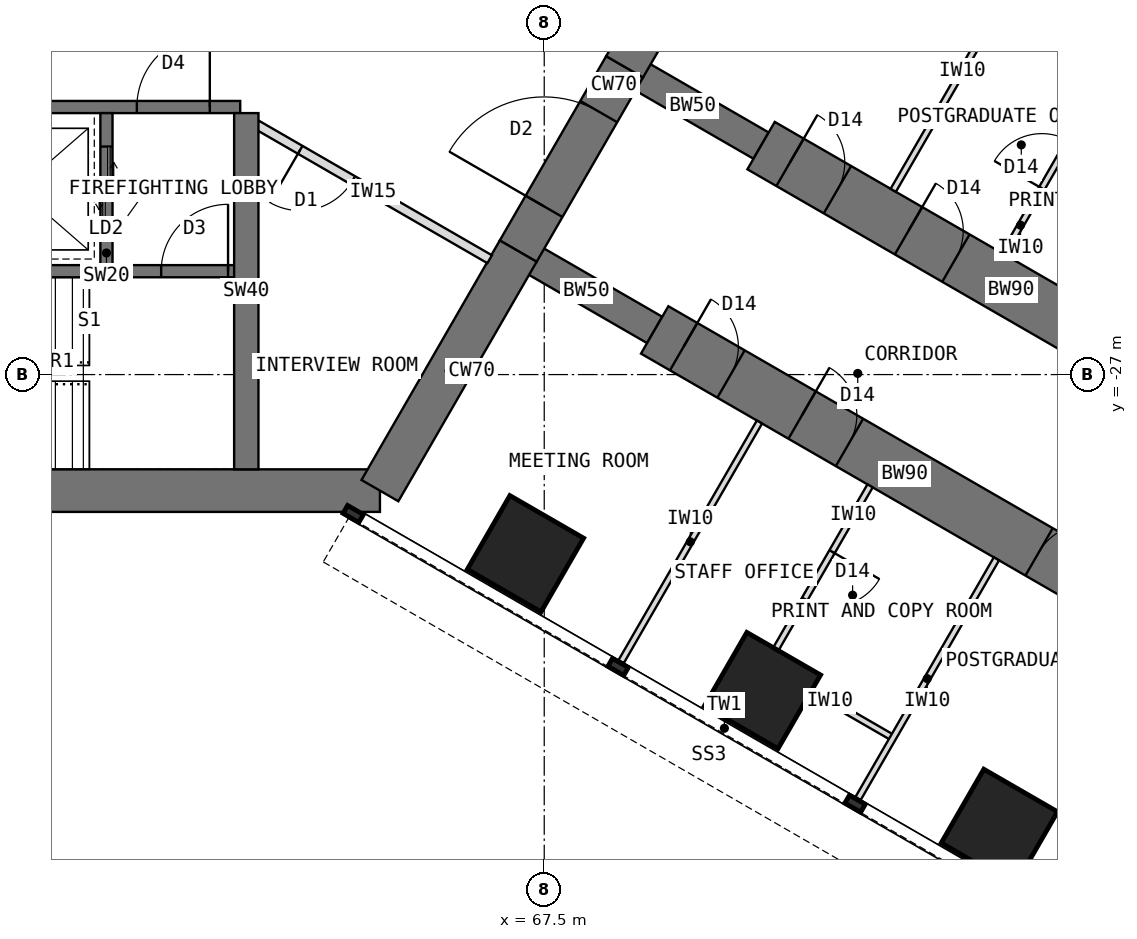
"""IFC4 building model, lengths in metres.
Left out: names, types, materials, properties, quantities, classifications, styles, units other than length and angle.
Written with IfcOpenShell. Run it as: python <this file> out.ifc"""

import sys

from ifc_helpers import new_model, si_unit, direction, frame, frame_2d, origin, origin_2d, place, context, subcontext, project, spatial, rectangle, extrude, element, fill, save


model = new_model("IFC4")
c1 = context("Model", 3, precision=1e-05, world=origin(), true_north=direction((0.0, 1.0)))
c2 = subcontext(c1, "Body", "Model", "MODEL_VIEW")
j1 = project(units=[si_unit("LENGTHUNIT", "METRE"), si_unit("PLANEANGLEUNIT", "RADIAN")], contexts=[c1])
p1 = place(None, origin())
s1 = spatial("IfcSite", under=j1, at=p1, CompositionType="ELEMENT")
p2 = place(p1, origin())
s2 = spatial("IfcBuilding", under=s1, at=p2, CompositionType="ELEMENT")
p3 = place(p2, frame((0.0, 0.0, 88.5)))
s3 = spatial("IfcBuildingStorey", under=s2, at=p3, CompositionType="ELEMENT", Elevation=88.5)
p4 = place(p3, frame((52.202, -28.908, 0.0), z_axis=(0.0, 0.0, 1.0), x_axis=(1.0, 0.0, 0.0)))
e1 = element("IfcWall", 1, at=p4, inside=s3, PredefinedType="SHEAR", context=c2, shape_type="SweptSolid", body=[
    extrude(rectangle(XDim=12.596, YDim=0.7, at=frame_2d((6.298, 0.0))), origin(), (0.0, 0.0, 1.0), 4.0),
])
p5 = place(p3, frame((64.798, -28.908, 0.0), z_axis=(0.0, 0.0, 1.0), x_axis=(0.499984222037, 0.866034513004, 0.0)))
e2 = element("IfcWall", 2, at=p5, inside=s3, PredefinedType="SHEAR", context=c2, shape_type="SweptSolid", body=[
    extrude(rectangle(XDim=4.548, YDim=0.7, at=frame_2d((2.274, 0.0))), origin(), (0.0, 0.0, 1.0), 4.0),
])
p6 = place(p3, frame((67.072, -24.97, 0.0), z_axis=(0.0, 0.0, 1.0), x_axis=(0.500010275428, 0.866019471182, 0.0)))
e3 = element("IfcWall", 3, at=p6, inside=s3, PredefinedType="SHEAR", context=c2, shape_type="SweptSolid", body=[
    extrude(rectangle(XDim=3.5, YDim=0.7, at=frame_2d((1.75, 0.0))), origin(), (0.0, 0.0, 1.0), 4.0),
])
p7 = place(p6, frame((0.85, 0.0, 0.0)))
e4 = element("IfcOpeningElement", 4, at=p7, cuts=e3, PredefinedType="OPENING", context=c2, shape_type="SweptSolid", body=[
    extrude(rectangle(XDim=1.8, YDim=2.1, at=frame_2d((0.9, 1.05))), frame((0.0, 0.36, 0.0), z_axis=(0.0, -1.0, 0.0), x_axis=(1.0, 0.0, 0.0)), (0.0, 0.0, 1.0), 0.72),
])
p8 = place(p3, frame((68.822, -21.939, 0.0), z_axis=(0.0, 0.0, 1.0), x_axis=(0.500024481964, 0.866011268655, 0.0)))
e5 = element("IfcWall", 5, at=p8, inside=s3, PredefinedType="SHEAR", context=c2, shape_type="SweptSolid", body=[
    extrude(rectangle(XDim=4.548, YDim=0.7, at=frame_2d((2.274, 0.0))), origin(), (0.0, 0.0, 1.0), 4.0),
])
p9 = place(p3, frame((68.822, -21.939, 0.0), z_axis=(0.0, 0.0, 1.0), x_axis=(0.866072649678, -0.499918158782, 0.0)))
e6 = element("IfcWall", 6, at=p9, inside=s3, PredefinedType="SHEAR", context=c2, shape_type="SweptSolid", body=[
    extrude(rectangle(XDim=2.592, YDim=0.5, at=frame_2d((1.296, 0.0))), origin(), (0.0, 0.0, 1.0), 4.0),
])
p10 = place(p3, frame((71.066, -23.234, 0.0), z_axis=(0.0, 0.0, 1.0), x_axis=(0.86602681393, -0.499997557548, 0.0)))
e7 = element("IfcWall", 7, at=p10, inside=s3, PredefinedType="SHEAR", context=c2, shape_type="SweptSolid", body=[
    extrude(rectangle(XDim=9.5, YDim=0.9, at=frame_2d((4.75, 0.0))), origin(), (0.0, 0.0, 1.0), 4.0),
])
p11 = place(p10, frame((0.55, 0.0, 0.0)))
e8 = element("IfcOpeningElement", 8, at=p11, cuts=e7, PredefinedType="OPENING", context=c2, shape_type="SweptSolid", body=[
    extrude(rectangle(XDim=0.9, YDim=2.1, at=frame_2d((0.45, 1.05))), frame((0.0, 0.46, 0.0), z_axis=(0.0, -1.0, 0.0), x_axis=(1.0, 0.0, 0.0)), (0.0, 0.0, 1.0), 0.92),
])
p12 = place(p10, frame((2.8, 0.0, 0.0)))
e9 = element("IfcOpeningElement", 9, at=p12, cuts=e7, PredefinedType="OPENING", context=c2, shape_type="SweptSolid", body=[
    extrude(rectangle(XDim=0.9, YDim=2.1, at=frame_2d((0.45, 1.05))), frame((0.0, 0.46, 0.0), z_axis=(0.0, -1.0, 0.0), x_axis=(1.0, 0.0, 0.0)), (0.0, 0.0, 1.0), 0.92),
])
p13 = place(p10, frame((7.3, 0.0, 0.0)))
e10 = element("IfcOpeningElement", 10, at=p13, cuts=e7, PredefinedType="OPENING", context=c2, shape_type="SweptSolid", body=[
    extrude(rectangle(XDim=0.9, YDim=2.1, at=frame_2d((0.45, 1.05))), frame((0.0, 0.46, 0.0), z_axis=(0.0, -1.0, 0.0), x_axis=(1.0, 0.0, 0.0)), (0.0, 0.0, 1.0), 0.92),
])
p14 = place(p3, frame((67.072, -24.97, 0.0), z_axis=(0.0, 0.0, 1.0), x_axis=(0.866031863473, -0.499988811324, 0.0)))
e11 = element("IfcWall", 11, at=p14, inside=s3, PredefinedType="SHEAR", context=c2, shape_type="SweptSolid", body=[
    extrude(rectangle(XDim=2.592, YDim=0.5, at=frame_2d((1.296, 0.0))), origin(), (0.0, 0.0, 1.0), 4.0),
])
p15 = place(p3, frame((69.316, -26.266, 0.0), z_axis=(0.0, 0.0, 1.0), x_axis=(0.86602681393, -0.499997557548, 0.0)))
e12 = element("IfcWall", 12, at=p15, inside=s3, PredefinedType="SHEAR", context=c2, shape_type="SweptSolid", body=[
    extrude(rectangle(XDim=9.5, YDim=0.9, at=frame_2d((4.75, 0.0))), origin(), (0.0, 0.0, 1.0), 4.0),
])
p16 = place(p15, frame((0.55, 0.0, 0.0)))
e13 = element("IfcOpeningElement", 13, at=p16, cuts=e12, PredefinedType="OPENING", context=c2, shape_type="SweptSolid", body=[
    extrude(rectangle(XDim=0.9, YDim=2.1, at=frame_2d((0.45, 1.05))), frame((0.0, 0.46, 0.0), z_axis=(0.0, -1.0, 0.0), x_axis=(1.0, 0.0, 0.0)), (0.0, 0.0, 1.0), 0.92),
])
p17 = place(p15, frame((2.8, 0.0, 0.0)))
e14 = element("IfcOpeningElement", 14, at=p17, cuts=e12, PredefinedType="OPENING", context=c2, shape_type="SweptSolid", body=[
    extrude(rectangle(XDim=0.9, YDim=2.1, at=frame_2d((0.45, 1.05))), frame((0.0, 0.46, 0.0), z_axis=(0.0, -1.0, 0.0), x_axis=(1.0, 0.0, 0.0)), (0.0, 0.0, 1.0), 0.92),
])
p18 = place(p15, frame((7.3, 0.0, 0.0)))
e15 = element("IfcOpeningElement", 15, at=p18, cuts=e12, PredefinedType="OPENING", context=c2, shape_type="SweptSolid", body=[
    extrude(rectangle(XDim=0.9, YDim=2.1, at=frame_2d((0.45, 1.05))), frame((0.0, 0.46, 0.0), z_axis=(0.0, -1.0, 0.0), x_axis=(1.0, 0.0, 0.0)), (0.0, 0.0, 1.0), 0.92),
])
for number, where, z_axis, x_axis in (
    (16, (67.191, -29.946, 0.0), (0.0, 0.0, 1.0), (0.5, 0.866, 0.0)),
    (17, (71.088, -32.196, 0.0), (0.0, 0.0, 1.0), (0.5, 0.866, 0.0)),
    (18, (74.986, -34.446, 0.0), (0.0, 0.0, 1.0), (0.5, 0.866, 0.0)),
):
    element("IfcColumn", number, at=place(p3, frame(where, z_axis=z_axis, x_axis=x_axis)), inside=s3, PredefinedType="COLUMN", context=c2, shape_type="SweptSolid", body=[
        extrude(rectangle(XDim=1.4, YDim=1.4, at=origin_2d()), origin(), (0.0, 0.0, 1.0), 4.0),
    ])
p19 = place(p3, frame((54.5, -22.6, 0.0), z_axis=(0.0, 0.0, 1.0), x_axis=(1.0, 0.0, 0.0)))
e19 = element("IfcWall", 19, at=p19, inside=s3, PredefinedType="SHEAR", context=c2, shape_type="SweptSolid", body=[
    extrude(rectangle(XDim=8.0, YDim=0.2, at=frame_2d((4.0, 0.0))), origin(), (0.0, 0.0, 1.0), 4.0),
])
p20 = place(p19, frame((6.3, 0.0, 0.0)))
e20 = element("IfcOpeningElement", 20, at=p20, cuts=e19, PredefinedType="OPENING", context=c2, shape_type="SweptSolid", body=[
    extrude(rectangle(XDim=1.2, YDim=2.1, at=frame_2d((0.6, 1.05))), frame((0.0, 0.11, 0.0), z_axis=(0.0, -1.0, 0.0), x_axis=(1.0, 0.0, 0.0)), (0.0, 0.0, 1.0), 0.22),
])
p21 = place(p19, frame((0.9, 0.0, 0.0)))
e21 = element("IfcOpeningElement", 21, at=p21, cuts=e19, PredefinedType="OPENING", context=c2, shape_type="SweptSolid", body=[
    extrude(rectangle(XDim=1.1, YDim=2.2, at=frame_2d((0.55, 1.1))), frame((0.0, 0.11, 0.0), z_axis=(0.0, -1.0, 0.0), x_axis=(1.0, 0.0, 0.0)), (0.0, 0.0, 1.0), 0.22),
])
p22 = place(p3, frame((60.3, -22.7, 0.0), z_axis=(0.0, 0.0, 1.0), x_axis=(0.0, -1.0, 0.0)))
e22 = element("IfcWall", 22, at=p22, inside=s3, PredefinedType="SHEAR", context=c2, shape_type="SweptSolid", body=[
    extrude(rectangle(XDim=2.6, YDim=0.2, at=frame_2d((1.3, 0.0))), origin(), (0.0, 0.0, 1.0), 4.0),
])
p23 = place(p22, frame((0.55, 0.0, 0.0)))
e23 = element("IfcOpeningElement", 23, at=p23, cuts=e22, PredefinedType="OPENING", context=c2, shape_type="SweptSolid", body=[
    extrude(rectangle(XDim=1.3, YDim=2.2, at=frame_2d((0.65, 1.1))), frame((0.0, 0.11, 0.0), z_axis=(0.0, -1.0, 0.0), x_axis=(1.0, 0.0, 0.0)), (0.0, 0.0, 1.0), 0.22),
])
p24 = place(p3, frame((54.5, -25.3, 0.0), z_axis=(0.0, 0.0, 1.0), x_axis=(1.0, 0.0, 0.0)))
e24 = element("IfcWall", 24, at=p24, inside=s3, PredefinedType="SHEAR", context=c2, shape_type="SweptSolid", body=[
    extrude(rectangle(XDim=8.0, YDim=0.2, at=frame_2d((4.0, 0.0))), origin(), (0.0, 0.0, 1.0), 4.0),
])
p25 = place(p24, frame((6.7, 0.0, 0.0)))
e25 = element("IfcOpeningElement", 25, at=p25, cuts=e24, PredefinedType="OPENING", context=c2, shape_type="SweptSolid", body=[
    extrude(rectangle(XDim=1.1, YDim=2.1, at=frame_2d((0.55, 1.05))), frame((0.0, 0.11, 0.0), z_axis=(0.0, -1.0, 0.0), x_axis=(1.0, 0.0, 0.0)), (0.0, 0.0, 1.0), 0.22),
])
p26 = place(p3, frame((62.6, -22.7, 0.0), z_axis=(0.0, 0.0, 1.0), x_axis=(0.0, -1.0, 0.0)))
e26 = element("IfcWall", 26, at=p26, inside=s3, PredefinedType="SHEAR", context=c2, shape_type="SweptSolid", body=[
    extrude(rectangle(XDim=5.858, YDim=0.4, at=frame_2d((2.929, 0.0))), origin(), (0.0, 0.0, 1.0), 4.0),
])
p27 = place(p3, frame((73.24, -23.97, 0.0), z_axis=(0.0, 0.0, 1.0), x_axis=(0.499982560684, 0.866035472144, 0.0)))
e27 = element("IfcWall", 27, at=p27, inside=s3, PredefinedType="PARTITIONING", context=c2, shape_type="SweptSolid", body=[
    extrude(rectangle(XDim=4.55, YDim=0.1, at=frame_2d((2.275, 0.0))), origin(), (0.0, 0.0, 1.0), 3.7),
])
p28 = place(p3, frame((75.059, -25.02, 0.0), z_axis=(0.0, 0.0, 1.0), x_axis=(0.499977295307, 0.866038511948, 0.0)))
e28 = element("IfcWall", 28, at=p28, inside=s3, PredefinedType="PARTITIONING", context=c2, shape_type="SweptSolid", body=[
    extrude(rectangle(XDim=3.4, YDim=0.1, at=frame_2d((1.7, 0.0))), origin(), (0.0, 0.0, 1.0), 3.7),
])
p29 = place(p28, frame((1.25, 0.0, 0.0)))
e29 = element("IfcOpeningElement", 29, at=p29, cuts=e28, PredefinedType="OPENING", context=c2, shape_type="SweptSolid", body=[
    extrude(rectangle(XDim=0.9, YDim=2.1, at=frame_2d((0.45, 1.05))), frame((0.0, 0.06, 0.0), z_axis=(0.0, -1.0, 0.0), x_axis=(1.0, 0.0, 0.0)), (0.0, 0.0, 1.0), 0.12),
])
for number, where, z_axis, x_axis in (
    (30, (71.04, -27.78, 0.0), (0.0, 0.0, 1.0), (-0.5, -0.866, 0.0)),
    (31, (74.937, -30.03, 0.0), (0.0, 0.0, 1.0), (-0.5, -0.866, 0.0)),
):
    element("IfcWall", number, at=place(p3, frame(where, z_axis=z_axis, x_axis=x_axis)), inside=s3, PredefinedType="PARTITIONING", context=c2, shape_type="SweptSolid", body=[
        extrude(rectangle(XDim=4.55, YDim=0.1, at=frame_2d((2.275, 0.0))), origin(), (0.0, 0.0, 1.0), 3.7),
    ])
p30 = place(p3, frame((71.158, -31.775, 0.0), z_axis=(0.0, 0.0, 1.0), x_axis=(0.866006032174, -0.500033551112, 0.0)))
e32 = element("IfcWall", 32, at=p30, inside=s3, PredefinedType="PARTITIONING", context=c2, shape_type="SweptSolid", body=[
    extrude(rectangle(XDim=2.4, YDim=0.1, at=frame_2d((1.2, 0.0))), origin(), (0.0, 0.0, 1.0), 3.7),
])
p31 = place(p3, frame((72.859, -28.83, 0.0), z_axis=(0.0, 0.0, 1.0), x_axis=(-0.500062241894, -0.865989465428, 0.0)))
e33 = element("IfcWall", 33, at=p31, inside=s3, PredefinedType="PARTITIONING", context=c2, shape_type="SweptSolid", body=[
    extrude(rectangle(XDim=3.4, YDim=0.1, at=frame_2d((1.7, 0.0))), origin(), (0.0, 0.0, 1.0), 3.7),
])
p32 = place(p31, frame((1.25, 0.0, 0.0)))
e34 = element("IfcOpeningElement", 34, at=p32, cuts=e33, PredefinedType="OPENING", context=c2, shape_type="SweptSolid", body=[
    extrude(rectangle(XDim=0.9, YDim=2.1, at=frame_2d((0.45, 1.05))), frame((0.0, 0.06, 0.0), z_axis=(0.0, -1.0, 0.0), x_axis=(1.0, 0.0, 0.0)), (0.0, 0.0, 1.0), 0.12),
])
p33 = place(p3, frame((66.603, -25.103, 0.0), z_axis=(0.0, 0.0, 1.0), x_axis=(-0.866021148949, 0.500007369519, 0.0)))
e35 = element("IfcWall", 35, at=p33, inside=s3, PredefinedType="PARTITIONING", context=c2, shape_type="SweptSolid", body=[
    extrude(rectangle(XDim=4.426, YDim=0.15, at=frame_2d((2.213, 0.0))), origin(), (0.0, 0.0, 1.0), 3.7),
])
p34 = place(p33, frame((2.598, 0.0, 0.0)))
e36 = element("IfcOpeningElement", 36, at=p34, cuts=e35, PredefinedType="OPENING", context=c2, shape_type="SweptSolid", body=[
    extrude(rectangle(XDim=1.0, YDim=2.1, at=frame_2d((0.5, 1.05))), frame((0.0, 0.085, 0.0), z_axis=(0.0, -1.0, 0.0), x_axis=(1.0, 0.0, 0.0)), (0.0, 0.0, 1.0), 0.17),
])
p35 = place(p20, origin())
e37 = element("IfcDoor", 37, at=p35, inside=s3, OperationType="SINGLE_SWING_RIGHT", PredefinedType="DOOR", context=c2, shape_type="SweptSolid", body=[
    extrude(rectangle(XDim=1.2, YDim=2.1, at=frame_2d((0.6, 1.05))), frame((0.0, 0.025, 0.0), z_axis=(0.0, -1.0, 0.0), x_axis=(1.0, 0.0, 0.0)), (0.0, 0.0, 1.0), 0.05),
])
fill(e20, e37)
p36 = place(p23, origin())
e38 = element("IfcDoor", 38, at=p36, inside=s3, OperationType="DOUBLE_DOOR_SLIDING", PredefinedType="DOOR", context=c2, shape_type="SweptSolid", body=[
    extrude(rectangle(XDim=1.3, YDim=2.2, at=frame_2d((0.65, 1.1))), frame((0.0, 0.025, 0.0), z_axis=(0.0, -1.0, 0.0), x_axis=(1.0, 0.0, 0.0)), (0.0, 0.0, 1.0), 0.05),
])
fill(e23, e38)
p37 = place(p25, origin())
e39 = element("IfcDoor", 39, at=p37, inside=s3, OperationType="SINGLE_SWING_RIGHT", PredefinedType="DOOR", context=c2, shape_type="SweptSolid", body=[
    extrude(rectangle(XDim=1.1, YDim=2.1, at=frame_2d((0.55, 1.05))), frame((0.0, 0.025, 0.0), z_axis=(0.0, -1.0, 0.0), x_axis=(1.0, 0.0, 0.0)), (0.0, 0.0, 1.0), 0.05),
])
fill(e25, e39)
p38 = place(p7, origin())
e40 = element("IfcDoor", 40, at=p38, inside=s3, OperationType="DOUBLE_DOOR_DOUBLE_SWING", PredefinedType="DOOR", context=c2, shape_type="SweptSolid", body=[
    extrude(rectangle(XDim=1.72, YDim=2.06, at=frame_2d((0.9, 1.03))), frame((0.0, 0.025, 0.0), z_axis=(0.0, -1.0, 0.0), x_axis=(1.0, 0.0, 0.0)), (0.0, 0.0, 1.0), 0.05),
    extrude(rectangle(XDim=0.04, YDim=2.1, at=frame_2d((0.02, 1.05))), frame((0.0, 0.35, 0.0), z_axis=(0.0, -1.0, 0.0), x_axis=(1.0, 0.0, 0.0)), (0.0, 0.0, 1.0), 0.699),
    extrude(rectangle(XDim=0.04, YDim=2.1, at=frame_2d((1.78, 1.05))), frame((0.0, 0.35, 0.0), z_axis=(0.0, -1.0, 0.0), x_axis=(1.0, 0.0, 0.0)), (0.0, 0.0, 1.0), 0.699),
    extrude(rectangle(XDim=1.72, YDim=0.04, at=frame_2d((0.9, 2.08))), frame((0.0, 0.35, 0.0), z_axis=(0.0, -1.0, 0.0), x_axis=(1.0, 0.0, 0.0)), (0.0, 0.0, 1.0), 0.699),
])
fill(e4, e40)
p39 = place(p29, origin())
e41 = element("IfcDoor", 41, at=p39, inside=s3, OperationType="SINGLE_SWING_LEFT", PredefinedType="DOOR", context=c2, shape_type="SweptSolid", body=[
    extrude(rectangle(XDim=0.9, YDim=2.1, at=frame_2d((0.45, 1.05))), frame((0.0, 0.025, 0.0), z_axis=(0.0, -1.0, 0.0), x_axis=(1.0, 0.0, 0.0)), (0.0, 0.0, 1.0), 0.05),
])
fill(e29, e41)
p40 = place(p32, origin())
e42 = element("IfcDoor", 42, at=p40, inside=s3, OperationType="SINGLE_SWING_LEFT", PredefinedType="DOOR", context=c2, shape_type="SweptSolid", body=[
    extrude(rectangle(XDim=0.9, YDim=2.1, at=frame_2d((0.45, 1.05))), frame((0.0, 0.025, 0.0), z_axis=(0.0, -1.0, 0.0), x_axis=(1.0, 0.0, 0.0)), (0.0, 0.0, 1.0), 0.05),
])
fill(e34, e42)
p41 = place(p34, origin())
e43 = element("IfcDoor", 43, at=p41, inside=s3, OperationType="SINGLE_SWING_RIGHT", PredefinedType="DOOR", context=c2, shape_type="SweptSolid", body=[
    extrude(rectangle(XDim=1.0, YDim=2.1, at=frame_2d((0.5, 1.05))), frame((0.0, 0.025, 0.0), z_axis=(0.0, -1.0, 0.0), x_axis=(1.0, 0.0, 0.0)), (0.0, 0.0, 1.0), 0.05),
])
fill(e36, e43)
p42 = place(p11, origin())
e44 = element("IfcDoor", 44, at=p42, inside=s3, OperationType="SINGLE_SWING_LEFT", PredefinedType="DOOR", context=c2, shape_type="SweptSolid", body=[
    extrude(rectangle(XDim=0.82, YDim=2.06, at=frame_2d((0.45, 1.03))), frame((0.0, 0.025, 0.0), z_axis=(0.0, -1.0, 0.0), x_axis=(1.0, 0.0, 0.0)), (0.0, 0.0, 1.0), 0.05),
    extrude(rectangle(XDim=0.04, YDim=2.1, at=frame_2d((0.02, 1.05))), frame((0.0, 0.45, 0.0), z_axis=(0.0, -1.0, 0.0), x_axis=(1.0, 0.0, 0.0)), (0.0, 0.0, 1.0), 0.899),
    extrude(rectangle(XDim=0.04, YDim=2.1, at=frame_2d((0.88, 1.05))), frame((0.0, 0.45, 0.0), z_axis=(0.0, -1.0, 0.0), x_axis=(1.0, 0.0, 0.0)), (0.0, 0.0, 1.0), 0.899),
    extrude(rectangle(XDim=0.82, YDim=0.04, at=frame_2d((0.45, 2.08))), frame((0.0, 0.45, 0.0), z_axis=(0.0, -1.0, 0.0), x_axis=(1.0, 0.0, 0.0)), (0.0, 0.0, 1.0), 0.899),
])
fill(e8, e44)
p43 = place(p12, origin())
e45 = element("IfcDoor", 45, at=p43, inside=s3, OperationType="SINGLE_SWING_LEFT", PredefinedType="DOOR", context=c2, shape_type="SweptSolid", body=[
    extrude(rectangle(XDim=0.82, YDim=2.06, at=frame_2d((0.45, 1.03))), frame((0.0, 0.025, 0.0), z_axis=(0.0, -1.0, 0.0), x_axis=(1.0, 0.0, 0.0)), (0.0, 0.0, 1.0), 0.05),
    extrude(rectangle(XDim=0.04, YDim=2.1, at=frame_2d((0.02, 1.05))), frame((0.0, 0.45, 0.0), z_axis=(0.0, -1.0, 0.0), x_axis=(1.0, 0.0, 0.0)), (0.0, 0.0, 1.0), 0.899),
    extrude(rectangle(XDim=0.04, YDim=2.1, at=frame_2d((0.88, 1.05))), frame((0.0, 0.45, 0.0), z_axis=(0.0, -1.0, 0.0), x_axis=(1.0, 0.0, 0.0)), (0.0, 0.0, 1.0), 0.899),
    extrude(rectangle(XDim=0.82, YDim=0.04, at=frame_2d((0.45, 2.08))), frame((0.0, 0.45, 0.0), z_axis=(0.0, -1.0, 0.0), x_axis=(1.0, 0.0, 0.0)), (0.0, 0.0, 1.0), 0.899),
])
fill(e9, e45)
p44 = place(p16, origin())
e46 = element("IfcDoor", 46, at=p44, inside=s3, OperationType="SINGLE_SWING_LEFT", PredefinedType="DOOR", context=c2, shape_type="SweptSolid", body=[
    extrude(rectangle(XDim=0.82, YDim=2.06, at=frame_2d((0.45, 1.03))), frame((0.0, 0.025, 0.0), z_axis=(0.0, -1.0, 0.0), x_axis=(1.0, 0.0, 0.0)), (0.0, 0.0, 1.0), 0.05),
    extrude(rectangle(XDim=0.04, YDim=2.1, at=frame_2d((0.02, 1.05))), frame((0.0, 0.45, 0.0), z_axis=(0.0, -1.0, 0.0), x_axis=(1.0, 0.0, 0.0)), (0.0, 0.0, 1.0), 0.899),
    extrude(rectangle(XDim=0.04, YDim=2.1, at=frame_2d((0.88, 1.05))), frame((0.0, 0.45, 0.0), z_axis=(0.0, -1.0, 0.0), x_axis=(1.0, 0.0, 0.0)), (0.0, 0.0, 1.0), 0.899),
    extrude(rectangle(XDim=0.82, YDim=0.04, at=frame_2d((0.45, 2.08))), frame((0.0, 0.45, 0.0), z_axis=(0.0, -1.0, 0.0), x_axis=(1.0, 0.0, 0.0)), (0.0, 0.0, 1.0), 0.899),
])
fill(e13, e46)
p45 = place(p17, origin())
e47 = element("IfcDoor", 47, at=p45, inside=s3, OperationType="SINGLE_SWING_LEFT", PredefinedType="DOOR", context=c2, shape_type="SweptSolid", body=[
    extrude(rectangle(XDim=0.82, YDim=2.06, at=frame_2d((0.45, 1.03))), frame((0.0, 0.025, 0.0), z_axis=(0.0, -1.0, 0.0), x_axis=(1.0, 0.0, 0.0)), (0.0, 0.0, 1.0), 0.05),
    extrude(rectangle(XDim=0.04, YDim=2.1, at=frame_2d((0.02, 1.05))), frame((0.0, 0.45, 0.0), z_axis=(0.0, -1.0, 0.0), x_axis=(1.0, 0.0, 0.0)), (0.0, 0.0, 1.0), 0.899),
    extrude(rectangle(XDim=0.04, YDim=2.1, at=frame_2d((0.88, 1.05))), frame((0.0, 0.45, 0.0), z_axis=(0.0, -1.0, 0.0), x_axis=(1.0, 0.0, 0.0)), (0.0, 0.0, 1.0), 0.899),
    extrude(rectangle(XDim=0.82, YDim=0.04, at=frame_2d((0.45, 2.08))), frame((0.0, 0.45, 0.0), z_axis=(0.0, -1.0, 0.0), x_axis=(1.0, 0.0, 0.0)), (0.0, 0.0, 1.0), 0.899),
])
fill(e14, e47)
p46 = place(p18, origin())
e48 = element("IfcDoor", 48, at=p46, inside=s3, OperationType="SINGLE_SWING_RIGHT", PredefinedType="DOOR", context=c2, shape_type="SweptSolid", body=[
    extrude(rectangle(XDim=0.82, YDim=2.06, at=frame_2d((0.45, 1.03))), frame((0.0, 0.025, 0.0), z_axis=(0.0, -1.0, 0.0), x_axis=(1.0, 0.0, 0.0)), (0.0, 0.0, 1.0), 0.05),
    extrude(rectangle(XDim=0.04, YDim=2.1, at=frame_2d((0.02, 1.05))), frame((0.0, 0.45, 0.0), z_axis=(0.0, -1.0, 0.0), x_axis=(1.0, 0.0, 0.0)), (0.0, 0.0, 1.0), 0.899),
    extrude(rectangle(XDim=0.04, YDim=2.1, at=frame_2d((0.88, 1.05))), frame((0.0, 0.45, 0.0), z_axis=(0.0, -1.0, 0.0), x_axis=(1.0, 0.0, 0.0)), (0.0, 0.0, 1.0), 0.899),
    extrude(rectangle(XDim=0.82, YDim=0.04, at=frame_2d((0.45, 2.08))), frame((0.0, 0.45, 0.0), z_axis=(0.0, -1.0, 0.0), x_axis=(1.0, 0.0, 0.0)), (0.0, 0.0, 1.0), 0.899),
])
fill(e15, e48)
save(model, sys.argv[1])
